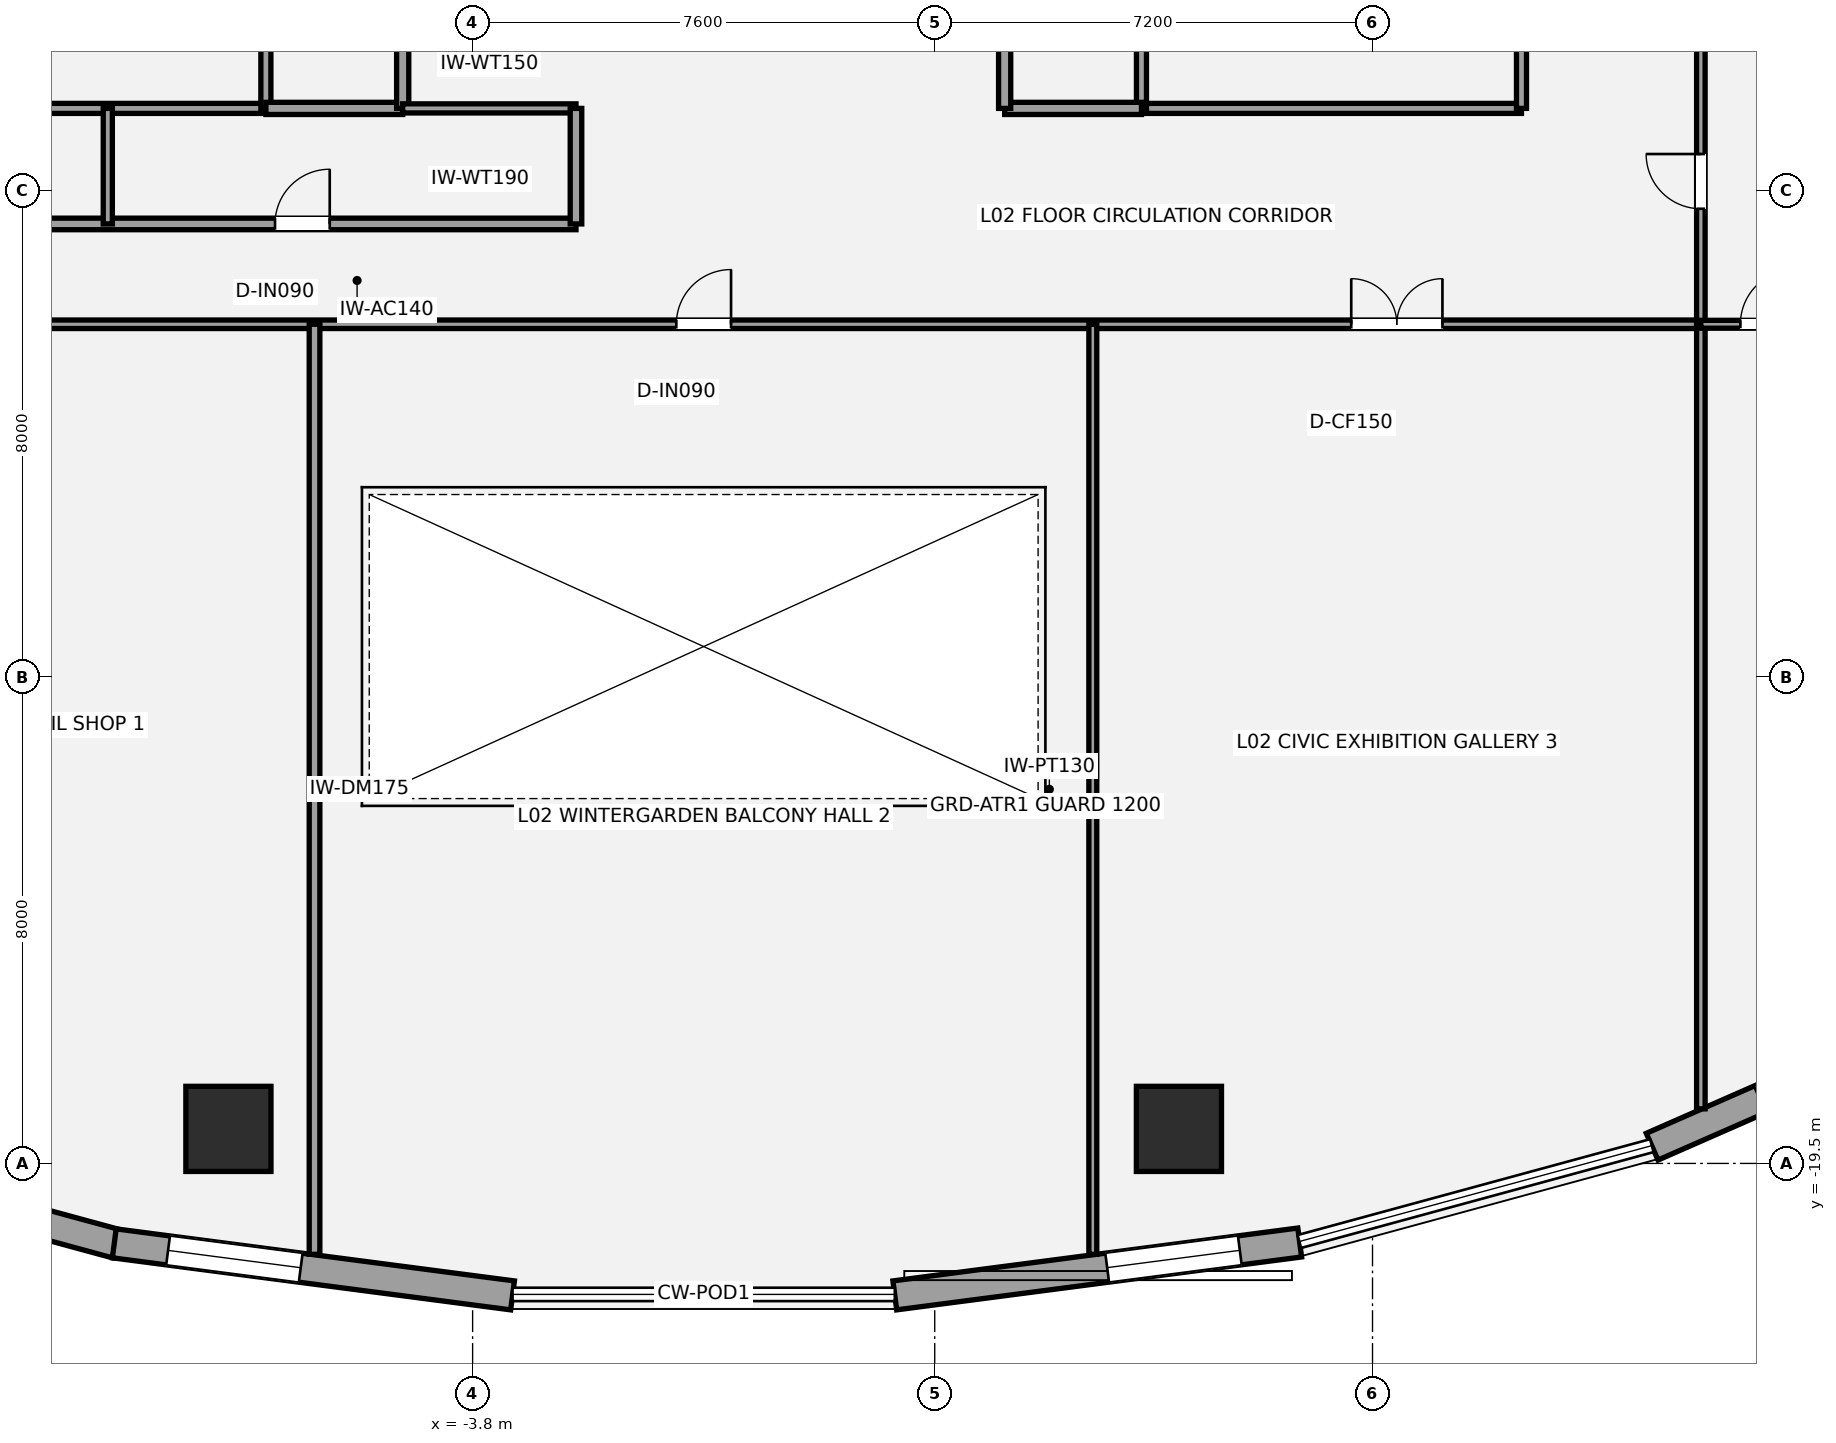
"""IFC4 building model, lengths in metres.
Left out: names, types, materials, properties, quantities, classifications, styles, units other than length and angle.
Written with IfcOpenShell. Run it as: python <this file> out.ifc"""

import sys

from ifc_helpers import new_model, si_unit, direction, frame, frame_2d, origin, origin_2d, place, context, subcontext, project, spatial, rectangle, hollow_circle, extrude, element, fill, save


model = new_model("IFC4")
c1 = context("Model", 3, precision=1e-05, world=origin(), true_north=direction((0.0, 1.0)))
c2 = subcontext(c1, "Body", "Model", "MODEL_VIEW")
j1 = project(units=[si_unit("LENGTHUNIT", "METRE"), si_unit("PLANEANGLEUNIT", "RADIAN")], contexts=[c1])
p1 = place(None, origin())
s1 = spatial("IfcSite", under=j1, at=p1, CompositionType="ELEMENT")
p2 = place(p1, origin())
s2 = spatial("IfcBuilding", under=s1, at=p2, CompositionType="ELEMENT")
p3 = place(p2, frame((0.0, 0.0, 10.2)))
s3 = spatial("IfcBuildingStorey", under=s2, at=p3, CompositionType="ELEMENT", Elevation=10.2)
for number, where, z_axis, x_axis in (
    (1, (-7.816, -18.932, 0.0), (0.0, 0.0, 1.0), (1.0, 0.0, 0.0)),
    (2, (7.816, -18.932, 0.0), (0.0, 0.0, 1.0), (1.0, 0.0, 0.0)),
):
    element("IfcColumn", number, at=place(p3, frame(where, z_axis=z_axis, x_axis=x_axis)), inside=s3, PredefinedType="USERDEFINED", context=c2, shape_type="SweptSolid", body=[
        extrude(hollow_circle(Radius=0.7, WallThickness=0.05, at=origin_2d()), origin(), (0.0, 0.0, 1.0), 4.2),
    ])
p4 = place(p3, frame((-9.662, -20.821, 0.0), z_axis=(0.0, 0.0, 1.0), x_axis=(-0.964936550718, 0.262483243445, 0.0)))
e3 = element("IfcWall", 3, at=p4, inside=s3, PredefinedType="STANDARD", context=c2, shape_type="SweptSolid", body=[
    extrude(rectangle(XDim=6.288, YDim=0.48, at=frame_2d((3.144, 0.0))), origin(), (0.0, 0.0, 1.0), 3.109),
])
p5 = place(p4, frame((2.044, 0.0, 0.7)))
e4 = element("IfcOpeningElement", 4, at=p5, cuts=e3, PredefinedType="OPENING", context=c2, shape_type="SweptSolid", body=[
    extrude(rectangle(XDim=2.2, YDim=1.95, at=frame_2d((1.1, 0.975))), frame((0.0, 0.25, 0.0), z_axis=(0.0, -1.0, 0.0), x_axis=(1.0, 0.0, 0.0)), (0.0, 0.0, 1.0), 0.5),
])
p6 = place(p3, frame((-3.143, -21.67, 0.0), z_axis=(0.0, 0.0, 1.0), x_axis=(-0.991574010877, 0.129541425626, 0.0)))
e5 = element("IfcWall", 5, at=p6, inside=s3, PredefinedType="STANDARD", context=c2, shape_type="SweptSolid", body=[
    extrude(rectangle(XDim=6.606, YDim=0.48, at=frame_2d((3.303, 0.0))), origin(), (0.0, 0.0, 1.0), 3.109),
])
p7 = place(p6, frame((3.513, 0.0, 0.7)))
e6 = element("IfcOpeningElement", 6, at=p7, cuts=e5, PredefinedType="OPENING", context=c2, shape_type="SweptSolid", body=[
    extrude(rectangle(XDim=2.2, YDim=1.95, at=frame_2d((1.1, 0.975))), frame((0.0, 0.25, 0.0), z_axis=(0.0, -1.0, 0.0), x_axis=(1.0, 0.0, 0.0)), (0.0, 0.0, 1.0), 0.5),
])
p8 = place(p3, frame((9.802, -20.801, 0.0), z_axis=(0.0, 0.0, 1.0), x_axis=(-0.991575864932, -0.12952723298, 0.0)))
e7 = element("IfcWall", 7, at=p8, inside=s3, PredefinedType="STANDARD", context=c2, shape_type="SweptSolid", body=[
    extrude(rectangle(XDim=6.716, YDim=0.48, at=frame_2d((3.358, 0.0))), origin(), (0.0, 0.0, 1.0), 3.109),
])
p9 = place(p8, frame((0.993, 0.0, 0.7)))
e8 = element("IfcOpeningElement", 8, at=p9, cuts=e7, PredefinedType="OPENING", context=c2, shape_type="SweptSolid", body=[
    extrude(rectangle(XDim=2.2, YDim=1.95, at=frame_2d((1.1, 0.975))), frame((0.0, 0.25, 0.0), z_axis=(0.0, -1.0, 0.0), x_axis=(1.0, 0.0, 0.0)), (0.0, 0.0, 1.0), 0.5),
])
p10 = place(p3, frame((21.156, -16.786, 0.0), z_axis=(0.0, 0.0, 1.0), x_axis=(-0.915720949248, -0.401814811957, 0.0)))
e9 = element("IfcWall", 9, at=p10, inside=s3, PredefinedType="STANDARD", context=c2, shape_type="SweptSolid", body=[
    extrude(rectangle(XDim=6.068, YDim=0.48, at=frame_2d((3.034, 0.0))), origin(), (0.0, 0.0, 1.0), 3.109),
])
p11 = place(p10, frame((1.934, 0.0, 0.7)))
e10 = element("IfcOpeningElement", 10, at=p11, cuts=e9, PredefinedType="OPENING", context=c2, shape_type="SweptSolid", body=[
    extrude(rectangle(XDim=2.2, YDim=1.95, at=frame_2d((1.1, 0.975))), frame((0.0, 0.25, 0.0), z_axis=(0.0, -1.0, 0.0), x_axis=(1.0, 0.0, 0.0)), (0.0, 0.0, 1.0), 0.5),
])
p12 = place(p3, frame((-13.45, -2.15, 0.0), z_axis=(0.0, 0.0, 1.0), x_axis=(1.0, 0.0, 0.0)))
e11 = element("IfcWall", 11, at=p12, inside=s3, PredefinedType="PARTITIONING", context=c2, shape_type="SweptSolid", body=[
    extrude(rectangle(XDim=6.25, YDim=0.165, at=frame_2d((3.125, 0.0))), origin(), (0.0, 0.0, 1.0), 3.98),
])
p13 = place(p3, frame((-7.2, -2.15, 0.0), z_axis=(0.0, 0.0, 1.0), x_axis=(0.0, 1.0, 0.0)))
e12 = element("IfcWall", 12, at=p13, inside=s3, PredefinedType="PARTITIONING", context=c2, shape_type="SweptSolid", body=[
    extrude(rectangle(XDim=3.15, YDim=0.165, at=frame_2d((1.575, 0.0))), origin(), (0.0, 0.0, 1.0), 3.98),
])
p14 = place(p3, frame((-7.2, -2.15, 0.0), z_axis=(0.0, 0.0, 1.0), x_axis=(1.0, 0.0, 0.0)))
e13 = element("IfcWall", 13, at=p14, inside=s3, PredefinedType="SOLIDWALL", context=c2, shape_type="SweptSolid", body=[
    extrude(rectangle(XDim=2.25, YDim=0.2, at=frame_2d((1.125, 0.0))), origin(), (0.0, 0.0, 1.0), 3.98),
])
p15 = place(p3, frame((-4.95, -2.15, 0.0), z_axis=(0.0, 0.0, 1.0), x_axis=(0.0, 1.0, 0.0)))
e14 = element("IfcWall", 14, at=p15, inside=s3, PredefinedType="SOLIDWALL", context=c2, shape_type="SweptSolid", body=[
    extrude(rectangle(XDim=3.15, YDim=0.2, at=frame_2d((1.575, 0.0))), origin(), (0.0, 0.0, 1.0), 3.348),
])
p16 = place(p15, frame((0.95, 0.0, 0.0)))
e15 = element("IfcOpeningElement", 15, at=p16, cuts=e14, PredefinedType="OPENING", context=c2, shape_type="SweptSolid", body=[
    extrude(rectangle(XDim=0.75, YDim=2.1, at=frame_2d((0.375, 1.05))), frame((0.0, 0.11, 0.0), z_axis=(0.0, -1.0, 0.0), x_axis=(1.0, 0.0, 0.0)), (0.0, 0.0, 1.0), 0.22),
])
p17 = place(p3, frame((7.2, -2.15, 0.0), z_axis=(0.0, 0.0, 1.0), x_axis=(1.0, 0.0, 0.0)))
e16 = element("IfcWall", 16, at=p17, inside=s3, PredefinedType="PARTITIONING", context=c2, shape_type="SweptSolid", body=[
    extrude(rectangle(XDim=6.25, YDim=0.165, at=frame_2d((3.125, 0.0))), origin(), (0.0, 0.0, 1.0), 3.98),
])
p18 = place(p3, frame((7.2, -2.15, 0.0), z_axis=(0.0, 0.0, 1.0), x_axis=(0.0, 1.0, 0.0)))
e17 = element("IfcWall", 17, at=p18, inside=s3, PredefinedType="PARTITIONING", context=c2, shape_type="SweptSolid", body=[
    extrude(rectangle(XDim=3.15, YDim=0.165, at=frame_2d((1.575, 0.0))), origin(), (0.0, 0.0, 1.0), 3.98),
])
p19 = place(p3, frame((13.45, -2.15, 0.0), z_axis=(0.0, 0.0, 1.0), x_axis=(0.0, 1.0, 0.0)))
e18 = element("IfcWall", 18, at=p19, inside=s3, PredefinedType="PARTITIONING", context=c2, shape_type="SweptSolid", body=[
    extrude(rectangle(XDim=3.15, YDim=0.165, at=frame_2d((1.575, 0.0))), origin(), (0.0, 0.0, 1.0), 3.433),
])
p20 = place(p19, frame((1.15, 0.0, 0.0)))
e19 = element("IfcOpeningElement", 19, at=p20, cuts=e18, PredefinedType="OPENING", context=c2, shape_type="SweptSolid", body=[
    extrude(rectangle(XDim=1.05, YDim=2.15, at=frame_2d((0.525, 1.075))), frame((0.0, 0.093, 0.0), z_axis=(0.0, -1.0, 0.0), x_axis=(1.0, 0.0, 0.0)), (0.0, 0.0, 1.0), 0.185),
])
p21 = place(p3, frame((4.95, -2.15, 0.0), z_axis=(0.0, 0.0, 1.0), x_axis=(1.0, 0.0, 0.0)))
e20 = element("IfcWall", 20, at=p21, inside=s3, PredefinedType="SOLIDWALL", context=c2, shape_type="SweptSolid", body=[
    extrude(rectangle(XDim=2.25, YDim=0.2, at=frame_2d((1.125, 0.0))), origin(), (0.0, 0.0, 1.0), 3.98),
])
p22 = place(p3, frame((4.95, -2.15, 0.0), z_axis=(0.0, 0.0, 1.0), x_axis=(0.0, 1.0, 0.0)))
e21 = element("IfcWall", 21, at=p22, inside=s3, PredefinedType="SOLIDWALL", context=c2, shape_type="SweptSolid", body=[
    extrude(rectangle(XDim=3.15, YDim=0.2, at=frame_2d((1.575, 0.0))), origin(), (0.0, 0.0, 1.0), 3.348),
])
p23 = place(p22, frame((0.95, 0.0, 0.0)))
e22 = element("IfcOpeningElement", 22, at=p23, cuts=e21, PredefinedType="OPENING", context=c2, shape_type="SweptSolid", body=[
    extrude(rectangle(XDim=0.75, YDim=2.1, at=frame_2d((0.375, 1.05))), frame((0.0, 0.11, 0.0), z_axis=(0.0, -1.0, 0.0), x_axis=(1.0, 0.0, 0.0)), (0.0, 0.0, 1.0), 0.22),
])
p24 = place(p3, frame((-13.45, -4.05, 0.0), z_axis=(0.0, 0.0, 1.0), x_axis=(1.0, 0.0, 0.0)))
e23 = element("IfcWall", 23, at=p24, inside=s3, PredefinedType="PLUMBINGWALL", context=c2, shape_type="SweptSolid", body=[
    extrude(rectangle(XDim=11.35, YDim=0.19, at=frame_2d((5.675, 0.0))), origin(), (0.0, 0.0, 1.0), 3.507),
])
p25 = place(p24, frame((1.25, 0.0, 0.0)))
e24 = element("IfcOpeningElement", 24, at=p25, cuts=e23, PredefinedType="OPENING", context=c2, shape_type="SweptSolid", body=[
    extrude(rectangle(XDim=0.95, YDim=2.15, at=frame_2d((0.475, 1.075))), frame((0.0, 0.105, 0.0), z_axis=(0.0, -1.0, 0.0), x_axis=(1.0, 0.0, 0.0)), (0.0, 0.0, 1.0), 0.21),
])
p26 = place(p24, frame((6.4, 0.0, 0.0)))
e25 = element("IfcOpeningElement", 25, at=p26, cuts=e23, PredefinedType="OPENING", context=c2, shape_type="SweptSolid", body=[
    extrude(rectangle(XDim=0.9, YDim=2.1, at=frame_2d((0.45, 1.05))), frame((0.0, 0.105, 0.0), z_axis=(0.0, -1.0, 0.0), x_axis=(1.0, 0.0, 0.0)), (0.0, 0.0, 1.0), 0.21),
])
p27 = place(p3, frame((-4.95, -2.15, 0.0), z_axis=(0.0, 0.0, 1.0), x_axis=(1.0, 0.0, 0.0)))
e26 = element("IfcWall", 26, at=p27, inside=s3, PredefinedType="PLUMBINGWALL", context=c2, shape_type="SweptSolid", body=[
    extrude(rectangle(XDim=2.85, YDim=0.15, at=frame_2d((1.425, 0.0))), origin(), (0.0, 0.0, 1.0), 3.98),
])
p28 = place(p3, frame((-2.1, -4.05, 0.0), z_axis=(0.0, 0.0, 1.0), x_axis=(0.0, 1.0, 0.0)))
e27 = element("IfcWall", 27, at=p28, inside=s3, PredefinedType="PLUMBINGWALL", context=c2, shape_type="SweptSolid", body=[
    extrude(rectangle(XDim=1.9, YDim=0.19, at=frame_2d((0.95, 0.0))), origin(), (0.0, 0.0, 1.0), 3.98),
])
p29 = place(p3, frame((-9.8, -4.05, 0.0), z_axis=(0.0, 0.0, 1.0), x_axis=(0.0, 1.0, 0.0)))
e28 = element("IfcWall", 28, at=p29, inside=s3, PredefinedType="PLUMBINGWALL", context=c2, shape_type="SweptSolid", body=[
    extrude(rectangle(XDim=1.9, YDim=0.15, at=frame_2d((0.95, 0.0))), origin(), (0.0, 0.0, 1.0), 3.98),
])
p30 = place(p3, frame((-16.4, -5.7, 0.0), z_axis=(0.0, 0.0, 1.0), x_axis=(1.0, 0.0, 0.0)))
e29 = element("IfcWall", 29, at=p30, inside=s3, PredefinedType="PARTITIONING", context=c2, shape_type="SweptSolid", body=[
    extrude(rectangle(XDim=32.8, YDim=0.14, at=frame_2d((16.4, 0.0))), origin(), (0.0, 0.0, 1.0), 3.98),
])
p31 = place(p30, frame((4.55, 0.0, 0.0)))
e30 = element("IfcOpeningElement", 30, at=p31, cuts=e29, PredefinedType="OPENING", context=c2, shape_type="SweptSolid", body=[
    extrude(rectangle(XDim=0.9, YDim=2.1, at=frame_2d((0.45, 1.05))), frame((0.0, 0.08, 0.0), z_axis=(0.0, -1.0, 0.0), x_axis=(1.0, 0.0, 0.0)), (0.0, 0.0, 1.0), 0.16),
])
p32 = place(p30, frame((15.95, 0.0, 0.0)))
e31 = element("IfcOpeningElement", 31, at=p32, cuts=e29, PredefinedType="OPENING", context=c2, shape_type="SweptSolid", body=[
    extrude(rectangle(XDim=0.9, YDim=2.1, at=frame_2d((0.45, 1.05))), frame((0.0, 0.08, 0.0), z_axis=(0.0, -1.0, 0.0), x_axis=(1.0, 0.0, 0.0)), (0.0, 0.0, 1.0), 0.16),
])
p33 = place(p30, frame((27.05, 0.0, 0.0)))
e32 = element("IfcOpeningElement", 32, at=p33, cuts=e29, PredefinedType="OPENING", context=c2, shape_type="SweptSolid", body=[
    extrude(rectangle(XDim=1.5, YDim=2.15, at=frame_2d((0.75, 1.075))), frame((0.0, 0.08, 0.0), z_axis=(0.0, -1.0, 0.0), x_axis=(1.0, 0.0, 0.0)), (0.0, 0.0, 1.0), 0.16),
])
p34 = place(p3, frame((16.4, -18.603, 0.0), z_axis=(0.0, 0.0, 1.0), x_axis=(0.0, 1.0, 0.0)))
e33 = element("IfcWall", 33, at=p34, inside=s3, PredefinedType="PARTITIONING", context=c2, shape_type="SweptSolid", body=[
    extrude(rectangle(XDim=26.153, YDim=0.14, at=frame_2d((13.076, 0.0))), origin(), (0.0, 0.0, 1.0), 3.348),
])
p35 = place(p34, frame((14.802, 0.0, 0.0)))
e34 = element("IfcOpeningElement", 34, at=p35, cuts=e33, PredefinedType="OPENING", context=c2, shape_type="SweptSolid", body=[
    extrude(rectangle(XDim=0.9, YDim=2.1, at=frame_2d((0.45, 1.05))), frame((0.0, 0.08, 0.0), z_axis=(0.0, -1.0, 0.0), x_axis=(1.0, 0.0, 0.0)), (0.0, 0.0, 1.0), 0.16),
])
p36 = place(p34, frame((19.552, 0.0, 0.0)))
e35 = element("IfcOpeningElement", 35, at=p36, cuts=e33, PredefinedType="OPENING", context=c2, shape_type="SweptSolid", body=[
    extrude(rectangle(XDim=0.9, YDim=2.1, at=frame_2d((0.45, 1.05))), frame((0.0, 0.08, 0.0), z_axis=(0.0, -1.0, 0.0), x_axis=(1.0, 0.0, 0.0)), (0.0, 0.0, 1.0), 0.16),
])
p37 = place(p34, frame((23.827, 0.0, 0.0)))
e36 = element("IfcOpeningElement", 36, at=p37, cuts=e33, PredefinedType="OPENING", context=c2, shape_type="SweptSolid", body=[
    extrude(rectangle(XDim=0.9, YDim=2.1, at=frame_2d((0.45, 1.05))), frame((0.0, 0.08, 0.0), z_axis=(0.0, -1.0, 0.0), x_axis=(1.0, 0.0, 0.0)), (0.0, 0.0, 1.0), 0.16),
])
p38 = place(p3, frame((-6.4, -20.995, 0.0), z_axis=(0.0, 0.0, 1.0), x_axis=(0.0, 1.0, 0.0)))
e37 = element("IfcWall", 37, at=p38, inside=s3, PredefinedType="PARTITIONING", context=c2, shape_type="SweptSolid", body=[
    extrude(rectangle(XDim=15.295, YDim=0.175, at=frame_2d((7.647, 0.0))), origin(), (0.0, 0.0, 1.0), 3.348),
])
p39 = place(p3, frame((6.4, -20.995, 0.0), z_axis=(0.0, 0.0, 1.0), x_axis=(0.0, 1.0, 0.0)))
e38 = element("IfcWall", 38, at=p39, inside=s3, PredefinedType="PARTITIONING", context=c2, shape_type="SweptSolid", body=[
    extrude(rectangle(XDim=15.295, YDim=0.13, at=frame_2d((7.647, 0.0))), origin(), (0.0, 0.0, 1.0), 3.348),
])
p40 = place(p3, frame((16.4, -5.7, 0.0), z_axis=(0.0, 0.0, 1.0), x_axis=(1.0, 0.0, 0.0)))
e39 = element("IfcWall", 39, at=p40, inside=s3, PredefinedType="PARTITIONING", context=c2, shape_type="SweptSolid", body=[
    extrude(rectangle(XDim=15.356, YDim=0.13, at=frame_2d((7.678, 0.0))), origin(), (0.0, 0.0, 1.0), 2.958),
])
p41 = place(p40, frame((0.65, 0.0, 0.0)))
e40 = element("IfcOpeningElement", 40, at=p41, cuts=e39, PredefinedType="OPENING", context=c2, shape_type="SweptSolid", body=[
    extrude(rectangle(XDim=0.9, YDim=2.1, at=frame_2d((0.45, 1.05))), frame((0.0, 0.075, 0.0), z_axis=(0.0, -1.0, 0.0), x_axis=(1.0, 0.0, 0.0)), (0.0, 0.0, 1.0), 0.15),
])
p42 = place(p7, origin())
e41 = element("IfcWindow", 41, at=p42, inside=s3, PartitioningType="SINGLE_PANEL", PredefinedType="WINDOW", context=c2, shape_type="SweptSolid", body=[
    extrude(rectangle(XDim=2.2, YDim=1.95, at=frame_2d((1.1, 0.975))), frame((0.0, -0.01, 0.0), z_axis=(0.0, -1.0, 0.0), x_axis=(1.0, 0.0, 0.0)), (0.0, 0.0, 1.0), 0.06),
])
fill(e6, e41)
p43 = place(p9, origin())
e42 = element("IfcWindow", 42, at=p43, inside=s3, PartitioningType="SINGLE_PANEL", PredefinedType="WINDOW", context=c2, shape_type="SweptSolid", body=[
    extrude(rectangle(XDim=2.2, YDim=1.95, at=frame_2d((1.1, 0.975))), frame((0.0, -0.01, 0.0), z_axis=(0.0, -1.0, 0.0), x_axis=(1.0, 0.0, 0.0)), (0.0, 0.0, 1.0), 0.06),
])
fill(e8, e42)
p44 = place(p26, origin())
e43 = element("IfcDoor", 43, at=p44, inside=s3, OperationType="SINGLE_SWING_RIGHT", PredefinedType="DOOR", context=c2, shape_type="SweptSolid", body=[
    extrude(rectangle(XDim=0.9, YDim=2.1, at=frame_2d((0.45, 1.05))), frame((0.0, 0.025, 0.0), z_axis=(0.0, -1.0, 0.0), x_axis=(1.0, 0.0, 0.0)), (0.0, 0.0, 1.0), 0.05),
])
fill(e25, e43)
p45 = place(p32, origin())
e44 = element("IfcDoor", 44, at=p45, inside=s3, OperationType="SINGLE_SWING_RIGHT", PredefinedType="DOOR", context=c2, shape_type="SweptSolid", body=[
    extrude(rectangle(XDim=0.9, YDim=2.1, at=frame_2d((0.45, 1.05))), frame((0.0, 0.025, 0.0), z_axis=(0.0, -1.0, 0.0), x_axis=(1.0, 0.0, 0.0)), (0.0, 0.0, 1.0), 0.05),
])
fill(e31, e44)
p46 = place(p33, origin())
e45 = element("IfcDoor", 45, at=p46, inside=s3, OperationType="DOUBLE_DOOR_SINGLE_SWING", PredefinedType="DOOR", context=c2, shape_type="SweptSolid", body=[
    extrude(rectangle(XDim=1.5, YDim=2.15, at=frame_2d((0.75, 1.075))), frame((0.0, 0.025, 0.0), z_axis=(0.0, -1.0, 0.0), x_axis=(1.0, 0.0, 0.0)), (0.0, 0.0, 1.0), 0.05),
])
fill(e32, e45)
p47 = place(p41, origin())
e46 = element("IfcDoor", 46, at=p47, inside=s3, OperationType="SINGLE_SWING_RIGHT", PredefinedType="DOOR", context=c2, shape_type="SweptSolid", body=[
    extrude(rectangle(XDim=0.9, YDim=2.1, at=frame_2d((0.45, 1.05))), frame((0.0, 0.025, 0.0), z_axis=(0.0, -1.0, 0.0), x_axis=(1.0, 0.0, 0.0)), (0.0, 0.0, 1.0), 0.05),
])
fill(e40, e46)
p48 = place(p35, origin())
e47 = element("IfcDoor", 47, at=p48, inside=s3, OperationType="SINGLE_SWING_RIGHT", PredefinedType="DOOR", context=c2, shape_type="SweptSolid", body=[
    extrude(rectangle(XDim=0.9, YDim=2.1, at=frame_2d((0.45, 1.05))), frame((0.0, 0.025, 0.0), z_axis=(0.0, -1.0, 0.0), x_axis=(1.0, 0.0, 0.0)), (0.0, 0.0, 1.0), 0.05),
])
fill(e34, e47)
save(model, sys.argv[1])
